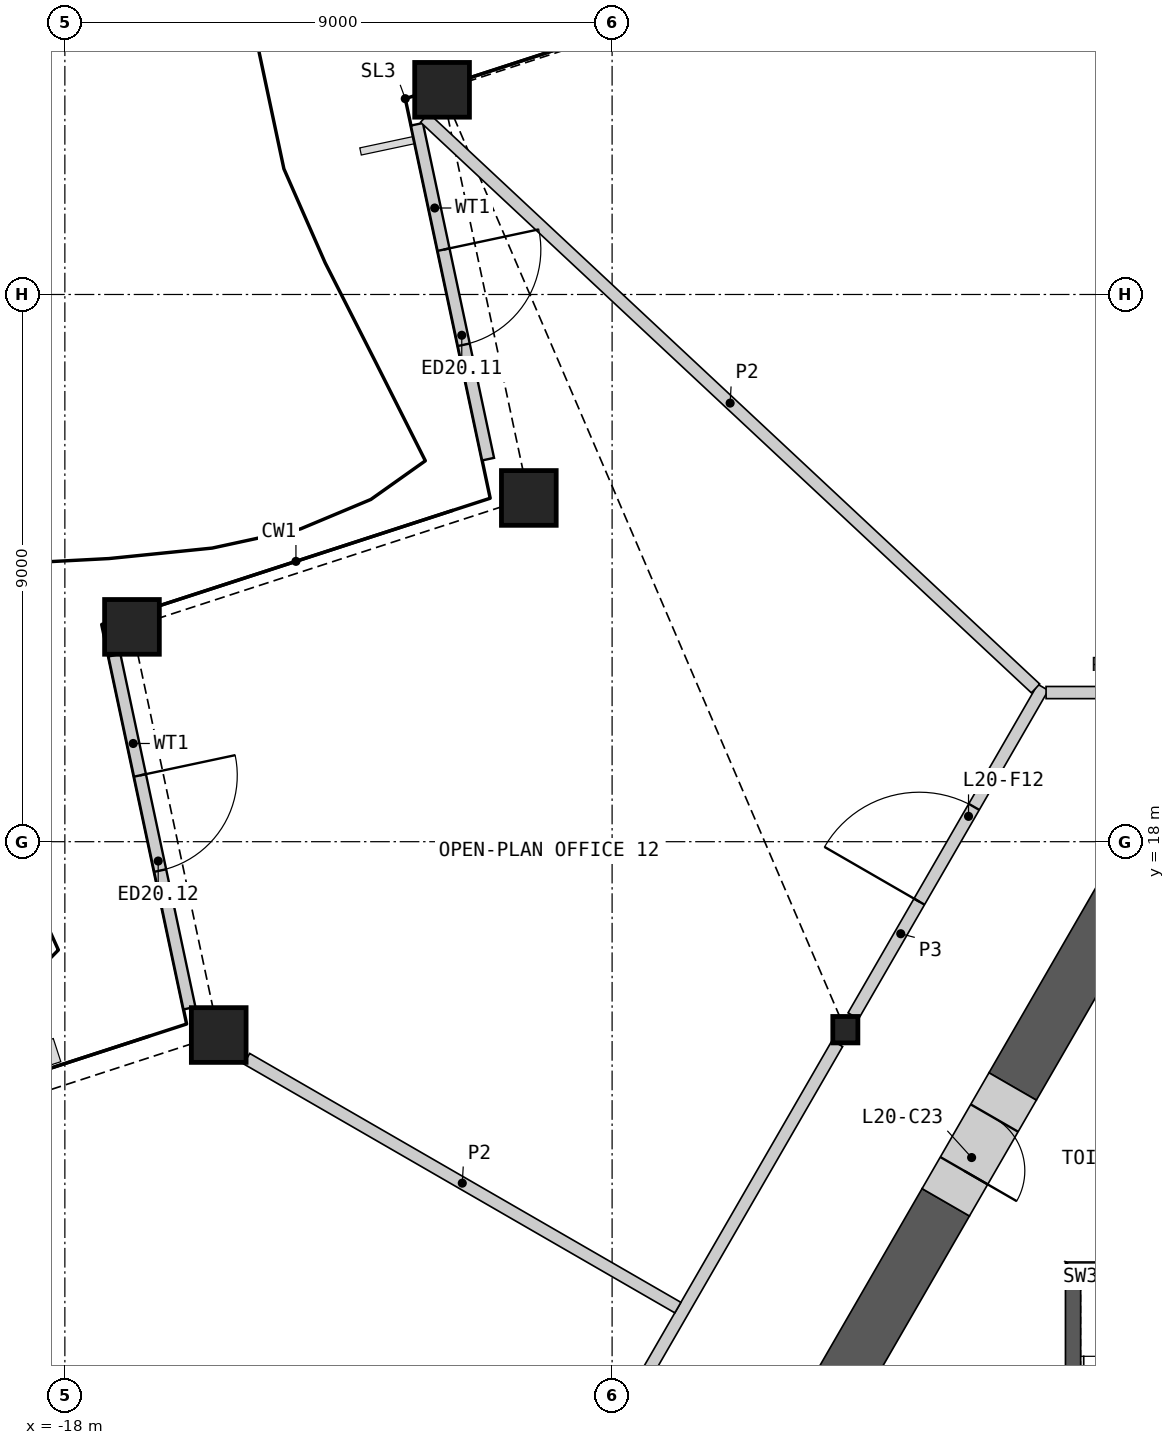
"""IFC4 building model, lengths in metres.
Left out: names, types, materials, properties, quantities, classifications, styles, units other than length and angle.
Written with IfcOpenShell. Run it as: python <this file> out.ifc"""

import sys

from ifc_helpers import new_model, si_unit, direction, frame, frame_2d, origin, origin_2d, place, context, subcontext, project, spatial, polyline, rectangle, hollow_rectangle, i_section, outline, extrude, element, fill, save


model = new_model("IFC4")
c1 = context("Model", 3, precision=1e-05, world=origin(), true_north=direction((0.0, 1.0)))
c2 = subcontext(c1, "Body", "Model", "MODEL_VIEW")
j1 = project(units=[si_unit("LENGTHUNIT", "METRE"), si_unit("PLANEANGLEUNIT", "RADIAN")], contexts=[c1])
p1 = place(None, origin())
s1 = spatial("IfcSite", under=j1, at=p1, CompositionType="ELEMENT")
p2 = place(p1, origin())
s2 = spatial("IfcBuilding", under=s1, at=p2, CompositionType="ELEMENT")
p3 = place(p2, frame((0.0, 0.0, 99.6)))
s3 = spatial("IfcBuildingStorey", under=s2, at=p3, CompositionType="ELEMENT", Elevation=99.6)
for number, where, z_axis, x_axis in (
    (1, (-11.796, 30.366, 0.0), (0.0, 0.0, 1.0), (1.0, 0.0, 0.0)),
    (2, (-10.37, 23.654, 0.0), (0.0, 0.0, 1.0), (1.0, 0.0, 0.0)),
    (3, (-16.896, 21.533, 0.0), (0.0, 0.0, 1.0), (1.0, 0.0, 0.0)),
    (4, (-15.469, 14.82, 0.0), (0.0, 0.0, 1.0), (1.0, 0.0, 0.0)),
):
    element("IfcColumn", number, at=place(p3, frame(where, z_axis=z_axis, x_axis=x_axis)), inside=s3, PredefinedType="COLUMN", context=c2, shape_type="SweptSolid", body=[
        extrude(hollow_rectangle(XDim=0.9, YDim=0.9, WallThickness=0.06, at=origin_2d()), origin(), (0.0, 0.0, 1.0), 4.2),
    ])
p4 = place(p3, frame((-5.164, 14.908, 0.0), z_axis=(0.0, 0.0, 1.0), x_axis=(1.0, 0.0, 0.0)))
e5 = element("IfcColumn", 5, at=p4, inside=s3, PredefinedType="COLUMN", context=c2, shape_type="SweptSolid", body=[
    extrude(i_section(OverallWidth=0.412, OverallDepth=0.435, WebThickness=0.036, FlangeThickness=0.057, at=origin_2d()), origin(), (0.0, 0.0, 1.0), 4.2),
])
p5 = place(p3, frame((-12.21, 29.799, 0.0), z_axis=(0.0, 0.0, 1.0), x_axis=(0.207917875772, -0.978146286061, 0.0)))
e6 = element("IfcWall", 6, at=p5, inside=s3, PredefinedType="SOLIDWALL", context=c2, shape_type="SweptSolid", body=[
    extrude(rectangle(XDim=5.63, YDim=0.2, at=frame_2d((2.815, 0.0))), origin(), (0.0, 0.0, 1.0), 3.189),
])
p6 = place(p5, frame((2.107, 0.0, 0.0)))
e7 = element("IfcOpeningElement", 7, at=p6, cuts=e6, PredefinedType="OPENING", context=c2, shape_type="SweptSolid", body=[
    extrude(rectangle(XDim=1.6, YDim=2.4, at=frame_2d((0.8, 1.2))), frame((0.0, 0.11, 0.0), z_axis=(0.0, -1.0, 0.0), x_axis=(1.0, 0.0, 0.0)), (0.0, 0.0, 1.0), 0.22),
])
p7 = place(p3, frame((-17.185, 21.066, 0.0), z_axis=(0.0, 0.0, 1.0), x_axis=(0.207930102794, -0.978143686966, 0.0)))
e8 = element("IfcWall", 8, at=p7, inside=s3, PredefinedType="SOLIDWALL", context=c2, shape_type="SweptSolid", body=[
    extrude(rectangle(XDim=5.934, YDim=0.2, at=frame_2d((2.967, 0.0))), origin(), (0.0, 0.0, 1.0), 3.189),
])
p8 = place(p7, frame((2.02, 0.0, 0.0)))
e9 = element("IfcOpeningElement", 9, at=p8, cuts=e8, PredefinedType="OPENING", context=c2, shape_type="SweptSolid", body=[
    extrude(rectangle(XDim=1.6, YDim=2.4, at=frame_2d((0.8, 1.2))), frame((0.0, 0.11, 0.0), z_axis=(0.0, -1.0, 0.0), x_axis=(1.0, 0.0, 0.0)), (0.0, 0.0, 1.0), 0.22),
])
p9 = place(p3, origin())
e10 = element("IfcWall", 10, at=p9, inside=s3, PredefinedType="SHEAR", context=c2, shape_type="SweptSolid", body=[
    extrude(outline(polyline([(1.544, 11.087), (-1.544, 11.087), (-1.294, 10.837), (1.294, 10.837), (1.544, 11.087)])), origin(), (0.0, 0.0, 1.0), 3.8),
])
p10 = place(p3, origin())
e11 = element("IfcWall", 11, at=p10, inside=s3, PredefinedType="SHEAR", context=c2, shape_type="SweptSolid", body=[
    extrude(outline(polyline([(-1.294, 10.837), (-1.544, 11.087), (-1.544, 5.237), (-1.294, 5.237), (-1.294, 10.837)])), origin(), (0.0, 0.0, 1.0), 3.8),
])
p11 = place(p3, frame((-3.512, 12.069, 0.0), z_axis=(0.0, 0.0, 1.0), x_axis=(-0.500002126466, -0.866024176065, 0.0)))
e12 = element("IfcWall", 12, at=p11, inside=s3, PredefinedType="SHEAR", context=c2, shape_type="SweptSolid", body=[
    extrude(rectangle(XDim=8.816, YDim=0.9, at=frame_2d((4.408, 0.0))), origin(), (0.0, 0.0, 1.0), 3.8),
])
p12 = place(p3, frame((-0.39, 17.478, 0.0), z_axis=(0.0, 0.0, 1.0), x_axis=(-0.500046330384, -0.865998653272, 0.0)))
e13 = element("IfcWall", 13, at=p12, inside=s3, PredefinedType="SHEAR", context=c2, shape_type="SweptSolid", body=[
    extrude(rectangle(XDim=4.045, YDim=0.9, at=frame_2d((2.023, 0.0))), origin(), (0.0, 0.0, 1.0), 3.8),
])
p13 = place(p3, frame((-2.413, 13.974, 0.0), z_axis=(0.0, 0.0, 1.0), x_axis=(-0.499946605688, -0.86605622881, 0.0)))
e14 = element("IfcWall", 14, at=p13, inside=s3, PredefinedType="SHEAR", context=c2, shape_type="SweptSolid", body=[
    extrude(rectangle(XDim=2.2, YDim=0.9, at=frame_2d((1.1, 0.0))), origin(), (0.0, 0.0, 1.0), 3.8),
])
p14 = place(p13, frame((0.6, 0.0, 0.0)))
e15 = element("IfcOpeningElement", 15, at=p14, cuts=e14, PredefinedType="OPENING", context=c2, shape_type="SweptSolid", body=[
    extrude(rectangle(XDim=1.0, YDim=2.1, at=frame_2d((0.5, 1.05))), frame((0.0, 0.46, 0.0), z_axis=(0.0, -1.0, 0.0), x_axis=(1.0, 0.0, 0.0)), (0.0, 0.0, 1.0), 0.92),
])
p15 = place(p3, frame((-10.197, 6.19, 0.0), z_axis=(0.0, 0.0, 1.0), x_axis=(0.500012035596, 0.866018454918, 0.0)))
e16 = element("IfcWall", 16, at=p15, inside=s3, PredefinedType="PARTITIONING", context=c2, shape_type="SweptSolid", body=[
    extrude(rectangle(XDim=9.803, YDim=0.2, at=frame_2d((4.902, 0.0))), origin(), (0.0, 0.0, 1.0), 3.8),
])
p16 = place(p3, frame((-5.033, 15.135, 0.0), z_axis=(0.0, 0.0, 1.0), x_axis=(0.499980978912, 0.866036385336, 0.0)))
e17 = element("IfcWall", 17, at=p16, inside=s3, PredefinedType="PARTITIONING", context=c2, shape_type="SweptSolid", body=[
    extrude(rectangle(XDim=6.24, YDim=0.2, at=frame_2d((3.12, 0.0))), origin(), (0.0, 0.0, 1.0), 3.8),
])
p17 = place(p16, frame((2.169, 0.0, 0.0)))
e18 = element("IfcOpeningElement", 18, at=p17, cuts=e17, PredefinedType="OPENING", context=c2, shape_type="SweptSolid", body=[
    extrude(rectangle(XDim=1.8, YDim=2.1, at=frame_2d((0.9, 1.05))), frame((0.0, 0.11, 0.0), z_axis=(0.0, -1.0, 0.0), x_axis=(1.0, 0.0, 0.0)), (0.0, 0.0, 1.0), 0.22),
])
p18 = place(p3, frame((-1.863, 20.453, 0.0), z_axis=(0.0, 0.0, 1.0), x_axis=(1.0, 0.0, 0.0)))
e19 = element("IfcWall", 19, at=p18, inside=s3, PredefinedType="PARTITIONING", context=c2, shape_type="SweptSolid", body=[
    extrude(rectangle(XDim=3.726, YDim=0.2, at=frame_2d((1.863, 0.0))), origin(), (0.0, 0.0, 1.0), 3.8),
])
p19 = place(p18, frame((1.363, 0.0, 0.0)))
e20 = element("IfcOpeningElement", 20, at=p19, cuts=e19, PredefinedType="OPENING", context=c2, shape_type="SweptSolid", body=[
    extrude(rectangle(XDim=1.0, YDim=2.1, at=frame_2d((0.5, 1.05))), frame((0.0, 0.11, 0.0), z_axis=(0.0, -1.0, 0.0), x_axis=(1.0, 0.0, 0.0)), (0.0, 0.0, 1.0), 0.22),
])
p20 = place(p3, frame((-12.082, 29.906, 0.0), z_axis=(0.0, 0.0, 1.0), x_axis=(0.730716801277, -0.682680713315, 0.0)))
e21 = element("IfcWall", 21, at=p20, inside=s3, PredefinedType="PARTITIONING", context=c2, shape_type="SweptSolid", body=[
    extrude(rectangle(XDim=13.748, YDim=0.2, at=frame_2d((6.874, 0.0))), origin(), (0.0, 0.0, 1.0), 2.885),
])
p21 = place(p3, frame((-15.01, 14.431, 0.0), z_axis=(0.0, 0.0, 1.0), x_axis=(0.866019738461, -0.5000098125, 0.0)))
e22 = element("IfcWall", 22, at=p21, inside=s3, PredefinedType="PARTITIONING", context=c2, shape_type="SweptSolid", body=[
    extrude(rectangle(XDim=8.188, YDim=0.2, at=frame_2d((4.094, 0.0))), origin(), (0.0, 0.0, 1.0), 2.885),
])
p22 = place(p6, origin())
e23 = element("IfcDoor", 23, at=p22, inside=s3, OperationType="DOUBLE_DOOR_SINGLE_SWING", PredefinedType="DOOR", context=c2, shape_type="SweptSolid", body=[
    extrude(rectangle(XDim=1.6, YDim=2.4, at=frame_2d((0.8, 1.2))), frame((0.0, 0.025, 0.0), z_axis=(0.0, -1.0, 0.0), x_axis=(1.0, 0.0, 0.0)), (0.0, 0.0, 1.0), 0.05),
])
fill(e7, e23)
p23 = place(p8, origin())
e24 = element("IfcDoor", 24, at=p23, inside=s3, OperationType="DOUBLE_DOOR_SINGLE_SWING", PredefinedType="DOOR", context=c2, shape_type="SweptSolid", body=[
    extrude(rectangle(XDim=1.6, YDim=2.4, at=frame_2d((0.8, 1.2))), frame((0.0, 0.025, 0.0), z_axis=(0.0, -1.0, 0.0), x_axis=(1.0, 0.0, 0.0)), (0.0, 0.0, 1.0), 0.05),
])
fill(e9, e24)
p24 = place(p14, origin())
e25 = element("IfcDoor", 25, at=p24, inside=s3, OperationType="SINGLE_SWING_RIGHT", PredefinedType="DOOR", context=c2, shape_type="SweptSolid", body=[
    extrude(rectangle(XDim=1.0, YDim=2.1, at=frame_2d((0.5, 1.05))), frame((0.0, 0.205, 0.0), z_axis=(0.0, -1.0, 0.0), x_axis=(1.0, 0.0, 0.0)), (0.0, 0.0, 1.0), 0.05),
])
fill(e15, e25)
p25 = place(p17, origin())
e26 = element("IfcDoor", 26, at=p25, inside=s3, OperationType="DOUBLE_DOOR_SINGLE_SWING", PredefinedType="DOOR", context=c2, shape_type="SweptSolid", body=[
    extrude(rectangle(XDim=1.8, YDim=2.1, at=frame_2d((0.9, 1.05))), frame((0.0, 0.025, 0.0), z_axis=(0.0, -1.0, 0.0), x_axis=(1.0, 0.0, 0.0)), (0.0, 0.0, 1.0), 0.05),
])
fill(e18, e26)
save(model, sys.argv[1])
